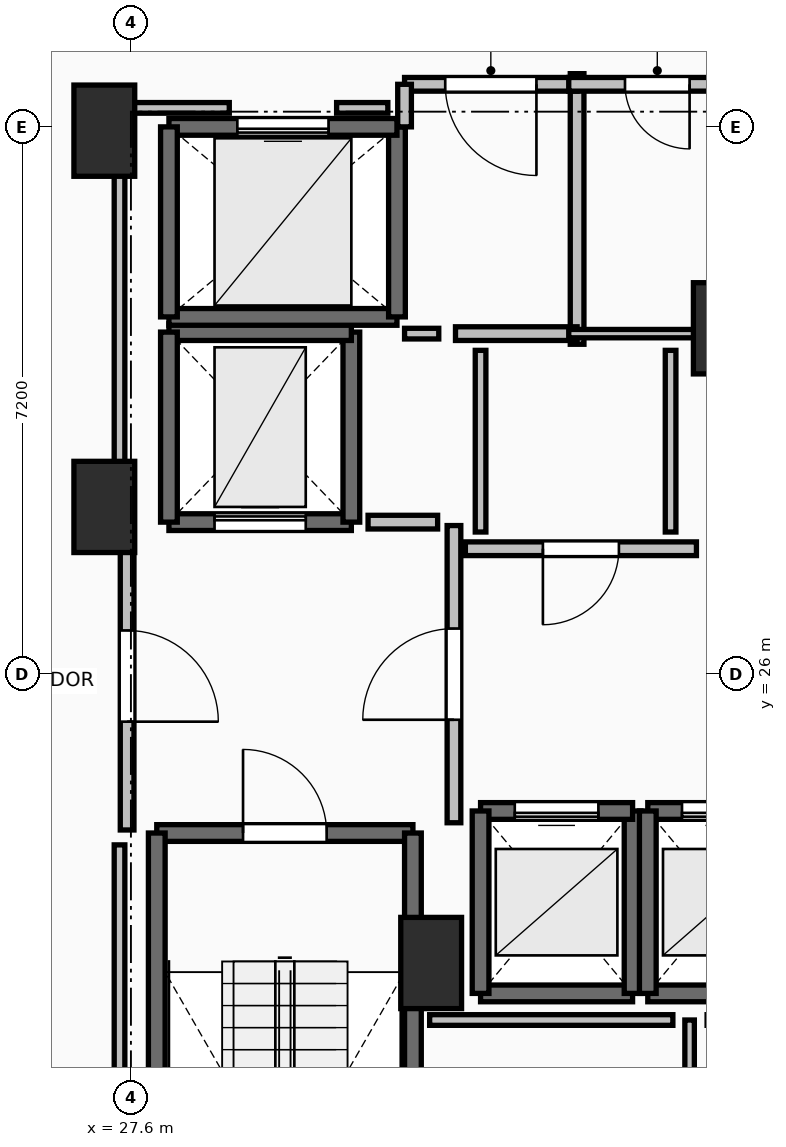
"""IFC4 building model, lengths in metres.
Left out: names, types, materials, properties, quantities, classifications, styles, units other than length and angle.
Written with IfcOpenShell. Run it as: python <this file> out.ifc"""

import sys

from ifc_helpers import new_model, si_unit, direction, frame, frame_2d, origin, origin_2d, place, context, subcontext, project, spatial, rectangle, extrude, element, fill, save


model = new_model("IFC4")
c1 = context("Model", 3, precision=1e-05, world=origin(), true_north=direction((0.0, 1.0)))
c2 = subcontext(c1, "Body", "Model", "MODEL_VIEW")
j1 = project(units=[si_unit("LENGTHUNIT", "METRE"), si_unit("PLANEANGLEUNIT", "RADIAN")], contexts=[c1])
p1 = place(None, origin())
s1 = spatial("IfcSite", under=j1, at=p1, CompositionType="ELEMENT")
p2 = place(p1, origin())
s2 = spatial("IfcBuilding", under=s1, at=p2, CompositionType="ELEMENT")
p3 = place(p2, frame((0.0, 0.0, 132.6)))
s3 = spatial("IfcBuildingStorey", under=s2, at=p3, CompositionType="ELEMENT", Elevation=132.6)
for number, where, z_axis, x_axis in (
    (1, (27.25, 28.2, 0.0), (0.0, 0.0, 1.0), (1.0, 0.0, 0.0)),
    (2, (27.25, 33.15, 0.0), (0.0, 0.0, 1.0), (1.0, 0.0, 0.0)),
    (3, (31.55, 22.2, 0.0), (0.0, 0.0, 1.0), (1.0, 0.0, 0.0)),
    (4, (35.4, 30.55, 0.0), (0.0, 0.0, 1.0), (1.0, 0.0, 0.0)),
):
    element("IfcColumn", number, at=place(p3, frame(where, z_axis=z_axis, x_axis=x_axis)), inside=s3, PredefinedType="PILASTER", context=c2, shape_type="SweptSolid", body=[
        extrude(rectangle(XDim=0.8, YDim=1.2, at=origin_2d()), origin(), (0.0, 0.0, 1.0), 3.5),
    ])
p4 = place(p3, frame((27.94, 23.91, 0.0), z_axis=(0.0, 0.0, 1.0), x_axis=(1.0, 0.0, 0.0)))
e5 = element("IfcWall", 5, at=p4, inside=s3, PredefinedType="SOLIDWALL", context=c2, shape_type="SweptSolid", body=[
    extrude(rectangle(XDim=3.37, YDim=0.22, at=frame_2d((1.685, 0.0))), origin(), (0.0, 0.0, 1.0), 3.24),
])
p5 = place(p4, frame((1.135, 0.0, 0.0)))
e6 = element("IfcOpeningElement", 6, at=p5, cuts=e5, PredefinedType="OPENING", context=c2, shape_type="SweptSolid", body=[
    extrude(rectangle(XDim=1.1, YDim=2.15, at=frame_2d((0.55, 1.075))), frame((0.0, 0.125, 0.0), z_axis=(0.0, -1.0, 0.0), x_axis=(1.0, 0.0, 0.0)), (0.0, 0.0, 1.0), 0.25),
])
for number, where, z_axis, x_axis in (
    (7, (31.31, 23.91, 0.0), (0.0, 0.0, 1.0), (0.0, -1.0, 0.0)),
    (8, (27.94, 16.49, 0.0), (0.0, 0.0, 1.0), (0.0, 1.0, 0.0)),
):
    element("IfcWall", number, at=place(p3, frame(where, z_axis=z_axis, x_axis=x_axis)), inside=s3, PredefinedType="SOLIDWALL", context=c2, shape_type="SweptSolid", body=[
        extrude(rectangle(XDim=7.42, YDim=0.22, at=frame_2d((3.71, 0.0))), origin(), (0.0, 0.0, 1.0), 3.24),
    ])
p6 = place(p3, frame((32.2, 21.8, 0.0), z_axis=(0.0, 0.0, 1.0), x_axis=(1.0, 0.0, 0.0)))
e9 = element("IfcWall", 9, at=p6, inside=s3, PredefinedType="SOLIDWALL", context=c2, shape_type="SweptSolid", body=[
    extrude(rectangle(XDim=2.0, YDim=0.22, at=frame_2d((1.0, 0.0))), origin(), (0.0, 0.0, 1.0), 3.24),
])
p7 = place(p3, frame((34.2, 21.8, 0.0), z_axis=(0.0, 0.0, 1.0), x_axis=(0.0, 1.0, 0.0)))
e10 = element("IfcWall", 10, at=p7, inside=s3, PredefinedType="SOLIDWALL", context=c2, shape_type="SweptSolid", body=[
    extrude(rectangle(XDim=2.4, YDim=0.22, at=frame_2d((1.2, 0.0))), origin(), (0.0, 0.0, 1.0), 3.24),
])
p8 = place(p3, frame((34.2, 24.2, 0.0), z_axis=(0.0, 0.0, 1.0), x_axis=(-1.0, 0.0, 0.0)))
e11 = element("IfcWall", 11, at=p8, inside=s3, PredefinedType="SOLIDWALL", context=c2, shape_type="SweptSolid", body=[
    extrude(rectangle(XDim=2.0, YDim=0.22, at=frame_2d((1.0, 0.0))), origin(), (0.0, 0.0, 1.0), 3.24),
])
p9 = place(p8, frame((0.45, 0.0, 0.0)))
e12 = element("IfcOpeningElement", 12, at=p9, cuts=e11, PredefinedType="OPENING", context=c2, shape_type="SweptSolid", body=[
    extrude(rectangle(XDim=1.1, YDim=2.2, at=frame_2d((0.55, 1.1))), frame((0.0, 0.125, 0.0), z_axis=(0.0, -1.0, 0.0), x_axis=(1.0, 0.0, 0.0)), (0.0, 0.0, 1.0), 0.25),
])
p10 = place(p3, frame((32.2, 24.2, 0.0), z_axis=(0.0, 0.0, 1.0), x_axis=(0.0, -1.0, 0.0)))
e13 = element("IfcWall", 13, at=p10, inside=s3, PredefinedType="SOLIDWALL", context=c2, shape_type="SweptSolid", body=[
    extrude(rectangle(XDim=2.4, YDim=0.22, at=frame_2d((1.2, 0.0))), origin(), (0.0, 0.0, 1.0), 3.24),
])
p11 = place(p3, frame((34.4, 21.8, 0.0), z_axis=(0.0, 0.0, 1.0), x_axis=(1.0, 0.0, 0.0)))
e14 = element("IfcWall", 14, at=p11, inside=s3, PredefinedType="SOLIDWALL", context=c2, shape_type="SweptSolid", body=[
    extrude(rectangle(XDim=2.0, YDim=0.22, at=frame_2d((1.0, 0.0))), origin(), (0.0, 0.0, 1.0), 3.24),
])
p12 = place(p3, frame((36.4, 24.2, 0.0), z_axis=(0.0, 0.0, 1.0), x_axis=(-1.0, 0.0, 0.0)))
e15 = element("IfcWall", 15, at=p12, inside=s3, PredefinedType="SOLIDWALL", context=c2, shape_type="SweptSolid", body=[
    extrude(rectangle(XDim=2.0, YDim=0.22, at=frame_2d((1.0, 0.0))), origin(), (0.0, 0.0, 1.0), 3.24),
])
p13 = place(p12, frame((0.45, 0.0, 0.0)))
e16 = element("IfcOpeningElement", 16, at=p13, cuts=e15, PredefinedType="OPENING", context=c2, shape_type="SweptSolid", body=[
    extrude(rectangle(XDim=1.1, YDim=2.2, at=frame_2d((0.55, 1.1))), frame((0.0, 0.125, 0.0), z_axis=(0.0, -1.0, 0.0), x_axis=(1.0, 0.0, 0.0)), (0.0, 0.0, 1.0), 0.25),
])
p14 = place(p3, frame((34.4, 24.2, 0.0), z_axis=(0.0, 0.0, 1.0), x_axis=(0.0, -1.0, 0.0)))
e17 = element("IfcWall", 17, at=p14, inside=s3, PredefinedType="SOLIDWALL", context=c2, shape_type="SweptSolid", body=[
    extrude(rectangle(XDim=2.4, YDim=0.22, at=frame_2d((1.2, 0.0))), origin(), (0.0, 0.0, 1.0), 3.24),
])
p15 = place(p3, frame((28.1, 28.0, 0.0), z_axis=(0.0, 0.0, 1.0), x_axis=(1.0, 0.0, 0.0)))
e18 = element("IfcWall", 18, at=p15, inside=s3, PredefinedType="SHEAR", context=c2, shape_type="SweptSolid", body=[
    extrude(rectangle(XDim=2.4, YDim=0.22, at=frame_2d((1.2, 0.0))), origin(), (0.0, 0.0, 1.0), 3.24),
])
p16 = place(p15, frame((0.6, 0.0, 0.0)))
e19 = element("IfcOpeningElement", 19, at=p16, cuts=e18, PredefinedType="OPENING", context=c2, shape_type="SweptSolid", body=[
    extrude(rectangle(XDim=1.2, YDim=2.2, at=frame_2d((0.6, 1.1))), frame((0.0, 0.125, 0.0), z_axis=(0.0, -1.0, 0.0), x_axis=(1.0, 0.0, 0.0)), (0.0, 0.0, 1.0), 0.25),
])
p17 = place(p3, frame((30.5, 28.0, 0.0), z_axis=(0.0, 0.0, 1.0), x_axis=(0.0, 1.0, 0.0)))
e20 = element("IfcWall", 20, at=p17, inside=s3, PredefinedType="SHEAR", context=c2, shape_type="SweptSolid", body=[
    extrude(rectangle(XDim=2.5, YDim=0.22, at=frame_2d((1.25, 0.0))), origin(), (0.0, 0.0, 1.0), 3.24),
])
p18 = place(p3, frame((30.5, 30.5, 0.0), z_axis=(0.0, 0.0, 1.0), x_axis=(-1.0, 0.0, 0.0)))
e21 = element("IfcWall", 21, at=p18, inside=s3, PredefinedType="SHEAR", context=c2, shape_type="SweptSolid", body=[
    extrude(rectangle(XDim=2.4, YDim=0.22, at=frame_2d((1.2, 0.0))), origin(), (0.0, 0.0, 1.0), 3.24),
])
p19 = place(p3, frame((28.1, 30.5, 0.0), z_axis=(0.0, 0.0, 1.0), x_axis=(0.0, -1.0, 0.0)))
e22 = element("IfcWall", 22, at=p19, inside=s3, PredefinedType="SHEAR", context=c2, shape_type="SweptSolid", body=[
    extrude(rectangle(XDim=2.5, YDim=0.22, at=frame_2d((1.25, 0.0))), origin(), (0.0, 0.0, 1.0), 3.24),
])
p20 = place(p3, frame((28.1, 30.7, 0.0), z_axis=(0.0, 0.0, 1.0), x_axis=(1.0, 0.0, 0.0)))
e23 = element("IfcWall", 23, at=p20, inside=s3, PredefinedType="SOLIDWALL", context=c2, shape_type="SweptSolid", body=[
    extrude(rectangle(XDim=3.0, YDim=0.22, at=frame_2d((1.5, 0.0))), origin(), (0.0, 0.0, 1.0), 3.24),
])
p21 = place(p3, frame((31.1, 30.7, 0.0), z_axis=(0.0, 0.0, 1.0), x_axis=(0.0, 1.0, 0.0)))
e24 = element("IfcWall", 24, at=p21, inside=s3, PredefinedType="SOLIDWALL", context=c2, shape_type="SweptSolid", body=[
    extrude(rectangle(XDim=2.5, YDim=0.22, at=frame_2d((1.25, 0.0))), origin(), (0.0, 0.0, 1.0), 3.24),
])
p22 = place(p3, frame((31.1, 33.2, 0.0), z_axis=(0.0, 0.0, 1.0), x_axis=(-1.0, 0.0, 0.0)))
e25 = element("IfcWall", 25, at=p22, inside=s3, PredefinedType="SOLIDWALL", context=c2, shape_type="SweptSolid", body=[
    extrude(rectangle(XDim=3.0, YDim=0.22, at=frame_2d((1.5, 0.0))), origin(), (0.0, 0.0, 1.0), 3.24),
])
p23 = place(p22, frame((0.9, 0.0, 0.0)))
e26 = element("IfcOpeningElement", 26, at=p23, cuts=e25, PredefinedType="OPENING", context=c2, shape_type="SweptSolid", body=[
    extrude(rectangle(XDim=1.2, YDim=2.2, at=frame_2d((0.6, 1.1))), frame((0.0, 0.125, 0.0), z_axis=(0.0, -1.0, 0.0), x_axis=(1.0, 0.0, 0.0)), (0.0, 0.0, 1.0), 0.25),
])
p24 = place(p3, frame((28.1, 33.2, 0.0), z_axis=(0.0, 0.0, 1.0), x_axis=(0.0, -1.0, 0.0)))
e27 = element("IfcWall", 27, at=p24, inside=s3, PredefinedType="SOLIDWALL", context=c2, shape_type="SweptSolid", body=[
    extrude(rectangle(XDim=2.5, YDim=0.22, at=frame_2d((1.25, 0.0))), origin(), (0.0, 0.0, 1.0), 3.24),
])
p25 = place(p3, frame((31.85, 24.045, 0.0), z_axis=(0.0, 0.0, 1.0), x_axis=(0.0, 1.0, 0.0)))
e28 = element("IfcWall", 28, at=p25, inside=s3, PredefinedType="PARTITIONING", context=c2, shape_type="SweptSolid", body=[
    extrude(rectangle(XDim=3.91, YDim=0.18, at=frame_2d((1.955, 0.0))), origin(), (0.0, 0.0, 1.0), 3.24),
])
p26 = place(p25, frame((1.355, 0.0, 0.0)))
e29 = element("IfcOpeningElement", 29, at=p26, cuts=e28, PredefinedType="OPENING", context=c2, shape_type="SweptSolid", body=[
    extrude(rectangle(XDim=1.2, YDim=2.15, at=frame_2d((0.6, 1.075))), frame((0.0, 0.105, 0.0), z_axis=(0.0, -1.0, 0.0), x_axis=(1.0, 0.0, 0.0)), (0.0, 0.0, 1.0), 0.21),
])
p27 = place(p3, frame((27.55, 28.0, 0.0), z_axis=(0.0, 0.0, 1.0), x_axis=(0.0, -1.0, 0.0)))
e30 = element("IfcWall", 30, at=p27, inside=s3, PredefinedType="PARTITIONING", context=c2, shape_type="SweptSolid", body=[
    extrude(rectangle(XDim=4.05, YDim=0.18, at=frame_2d((2.025, 0.0))), origin(), (0.0, 0.0, 1.0), 3.24),
])
p28 = place(p27, frame((1.425, 0.0, 0.0)))
e31 = element("IfcOpeningElement", 31, at=p28, cuts=e30, PredefinedType="OPENING", context=c2, shape_type="SweptSolid", body=[
    extrude(rectangle(XDim=1.2, YDim=2.15, at=frame_2d((0.6, 1.075))), frame((0.0, 0.105, 0.0), z_axis=(0.0, -1.0, 0.0), x_axis=(1.0, 0.0, 0.0)), (0.0, 0.0, 1.0), 0.21),
])
p29 = place(p3, frame((33.47, 30.34, 0.0), z_axis=(0.0, 0.0, 1.0), x_axis=(0.0, 1.0, 0.0)))
e32 = element("IfcWall", 32, at=p29, inside=s3, PredefinedType="PARTITIONING", context=c2, shape_type="SweptSolid", body=[
    extrude(rectangle(XDim=3.56, YDim=0.18, at=frame_2d((1.78, 0.0))), origin(), (0.0, 0.0, 1.0), 3.24),
])
p30 = place(p3, frame((31.87, 30.48, 0.0), z_axis=(0.0, 0.0, 1.0), x_axis=(1.0, 0.0, 0.0)))
e33 = element("IfcWall", 33, at=p30, inside=s3, PredefinedType="PARTITIONING", context=c2, shape_type="SweptSolid", body=[
    extrude(rectangle(XDim=1.6, YDim=0.18, at=frame_2d((0.8, 0.0))), origin(), (0.0, 0.0, 1.0), 3.24),
])
p31 = place(p3, frame((33.47, 33.76, 0.0), z_axis=(0.0, 0.0, 1.0), x_axis=(-1.0, 0.0, 0.0)))
e34 = element("IfcWall", 34, at=p31, inside=s3, PredefinedType="PARTITIONING", context=c2, shape_type="SweptSolid", body=[
    extrude(rectangle(XDim=2.27, YDim=0.18, at=frame_2d((1.135, 0.0))), origin(), (0.0, 0.0, 1.0), 3.24),
])
p32 = place(p31, frame((0.535, 0.0, 0.0)))
e35 = element("IfcOpeningElement", 35, at=p32, cuts=e34, PredefinedType="OPENING", context=c2, shape_type="SweptSolid", body=[
    extrude(rectangle(XDim=1.2, YDim=2.15, at=frame_2d((0.6, 1.075))), frame((0.0, 0.105, 0.0), z_axis=(0.0, -1.0, 0.0), x_axis=(1.0, 0.0, 0.0)), (0.0, 0.0, 1.0), 0.21),
])
p33 = place(p3, frame((31.2, 33.76, 0.0), z_axis=(0.0, 0.0, 1.0), x_axis=(0.0, -1.0, 0.0)))
e36 = element("IfcWall", 36, at=p33, inside=s3, PredefinedType="PARTITIONING", context=c2, shape_type="SweptSolid", body=[
    extrude(rectangle(XDim=0.56, YDim=0.18, at=frame_2d((0.28, 0.0))), origin(), (0.0, 0.0, 1.0), 3.24),
])
p34 = place(p3, frame((35.04, 27.65, 0.0), z_axis=(0.0, 0.0, 1.0), x_axis=(-1.0, 0.0, 0.0)))
e37 = element("IfcWall", 37, at=p34, inside=s3, PredefinedType="PARTITIONING", context=c2, shape_type="SweptSolid", body=[
    extrude(rectangle(XDim=3.04, YDim=0.18, at=frame_2d((1.52, 0.0))), origin(), (0.0, 0.0, 1.0), 3.24),
])
p35 = place(p34, frame((1.02, 0.0, 0.0)))
e38 = element("IfcOpeningElement", 38, at=p35, cuts=e37, PredefinedType="OPENING", context=c2, shape_type="SweptSolid", body=[
    extrude(rectangle(XDim=1.0, YDim=2.15, at=frame_2d((0.5, 1.075))), frame((0.0, 0.105, 0.0), z_axis=(0.0, -1.0, 0.0), x_axis=(1.0, 0.0, 0.0)), (0.0, 0.0, 1.0), 0.21),
])
p36 = place(p3, frame((33.36, 30.48, 0.0), z_axis=(0.0, 0.0, 1.0), x_axis=(1.0, 0.0, 0.0)))
e39 = element("IfcWall", 39, at=p36, inside=s3, PredefinedType="PARTITIONING", context=c2, shape_type="SweptSolid", body=[
    extrude(rectangle(XDim=1.81, YDim=0.11, at=frame_2d((0.905, 0.0))), origin(), (0.0, 0.0, 1.0), 3.24),
])
p37 = place(p3, frame((35.69, 33.76, 0.0), z_axis=(0.0, 0.0, 1.0), x_axis=(-1.0, 0.0, 0.0)))
e40 = element("IfcWall", 40, at=p37, inside=s3, PredefinedType="PARTITIONING", context=c2, shape_type="SweptSolid", body=[
    extrude(rectangle(XDim=2.33, YDim=0.18, at=frame_2d((1.165, 0.0))), origin(), (0.0, 0.0, 1.0), 3.24),
])
p38 = place(p37, frame((0.74, 0.0, 0.0)))
e41 = element("IfcOpeningElement", 41, at=p38, cuts=e40, PredefinedType="OPENING", context=c2, shape_type="SweptSolid", body=[
    extrude(rectangle(XDim=0.85, YDim=2.1, at=frame_2d((0.425, 1.05))), frame((0.0, 0.105, 0.0), z_axis=(0.0, -1.0, 0.0), x_axis=(1.0, 0.0, 0.0)), (0.0, 0.0, 1.0), 0.21),
])
p39 = place(p3, frame((34.95, 16.32, 0.0), z_axis=(0.0, 0.0, 1.0), x_axis=(0.0, 1.0, 0.0)))
e42 = element("IfcWall", 42, at=p39, inside=s3, PredefinedType="PARTITIONING", context=c2, shape_type="SweptSolid", body=[
    extrude(rectangle(XDim=5.13, YDim=0.125, at=frame_2d((2.565, 0.0))), origin(), (0.0, 0.0, 1.0), 3.24),
])
p40 = place(p3, frame((31.635, 28.0, 0.0), z_axis=(0.0, 0.0, 1.0), x_axis=(-1.0, 0.0, 0.0)))
e43 = element("IfcWall", 43, at=p40, inside=s3, PredefinedType="PARTITIONING", context=c2, shape_type="SweptSolid", body=[
    extrude(rectangle(XDim=0.915, YDim=0.18, at=frame_2d((0.458, 0.0))), origin(), (0.0, 0.0, 1.0), 3.24),
])
p41 = place(p3, frame((31.2, 30.48, 0.0), z_axis=(0.0, 0.0, 1.0), x_axis=(1.0, 0.0, 0.0)))
e44 = element("IfcWall", 44, at=p41, inside=s3, PredefinedType="PARTITIONING", context=c2, shape_type="SweptSolid", body=[
    extrude(rectangle(XDim=0.45, YDim=0.14, at=frame_2d((0.225, 0.0))), origin(), (0.0, 0.0, 1.0), 3.24),
])
p42 = place(p3, frame((34.73, 21.45, 0.0), z_axis=(0.0, 0.0, 1.0), x_axis=(-1.0, 0.0, 0.0)))
e45 = element("IfcWall", 45, at=p42, inside=s3, PredefinedType="PARTITIONING", context=c2, shape_type="SweptSolid", body=[
    extrude(rectangle(XDim=3.2, YDim=0.14, at=frame_2d((1.6, 0.0))), origin(), (0.0, 0.0, 1.0), 3.24),
])
for number, where, z_axis, x_axis in (
    (46, (32.2, 30.26, 0.0), (0.0, 0.0, 1.0), (0.0, -1.0, 0.0)),
    (47, (34.7, 27.87, 0.0), (0.0, 0.0, 1.0), (0.0, 1.0, 0.0)),
):
    element("IfcWall", number, at=place(p3, frame(where, z_axis=z_axis, x_axis=x_axis)), inside=s3, PredefinedType="PARTITIONING", context=c2, shape_type="SweptSolid", body=[
        extrude(rectangle(XDim=2.39, YDim=0.14, at=frame_2d((1.195, 0.0))), origin(), (0.0, 0.0, 1.0), 3.24),
    ])
p43 = place(p3, frame((30.98, 33.45, 0.0), z_axis=(0.0, 0.0, 1.0), x_axis=(-1.0, 0.0, 0.0)))
e48 = element("IfcWall", 48, at=p43, inside=s3, PredefinedType="PARTITIONING", context=c2, shape_type="SweptSolid", body=[
    extrude(rectangle(XDim=0.674, YDim=0.14, at=frame_2d((0.337, 0.0))), origin(), (0.0, 0.0, 1.0), 3.24),
])
p44 = place(p3, frame((28.894, 33.45, 0.0), z_axis=(0.0, 0.0, 1.0), x_axis=(-1.0, 0.0, 0.0)))
e49 = element("IfcWall", 49, at=p44, inside=s3, PredefinedType="PARTITIONING", context=c2, shape_type="SweptSolid", body=[
    extrude(rectangle(XDim=1.444, YDim=0.14, at=frame_2d((0.722, 0.0))), origin(), (0.0, 0.0, 1.0), 2.432),
])
p45 = place(p3, frame((27.45, 33.45, 0.0), z_axis=(0.0, 0.0, 1.0), x_axis=(0.0, -1.0, 0.0)))
e50 = element("IfcWall", 50, at=p45, inside=s3, PredefinedType="PARTITIONING", context=c2, shape_type="SweptSolid", body=[
    extrude(rectangle(XDim=5.254, YDim=0.14, at=frame_2d((2.627, 0.0))), origin(), (0.0, 0.0, 1.0), 2.432),
])
p46 = place(p3, frame((27.45, 23.754, 0.0), z_axis=(0.0, 0.0, 1.0), x_axis=(0.0, -1.0, 0.0)))
e51 = element("IfcWall", 51, at=p46, inside=s3, PredefinedType="PARTITIONING", context=c2, shape_type="SweptSolid", body=[
    extrude(rectangle(XDim=7.514, YDim=0.14, at=frame_2d((3.757, 0.0))), origin(), (0.0, 0.0, 1.0), 2.432),
])
p47 = place(p5, origin())
e52 = element("IfcDoor", 52, at=p47, inside=s3, OperationType="SINGLE_SWING_LEFT", PredefinedType="DOOR", context=c2, shape_type="SweptSolid", body=[
    extrude(rectangle(XDim=1.1, YDim=2.15, at=frame_2d((0.55, 1.075))), frame((0.0, 0.025, 0.0), z_axis=(0.0, -1.0, 0.0), x_axis=(1.0, 0.0, 0.0)), (0.0, 0.0, 1.0), 0.05),
])
fill(e6, e52)
p48 = place(p9, origin())
e53 = element("IfcDoor", 53, at=p48, inside=s3, OperationType="SLIDING_TO_LEFT", PredefinedType="DOOR", context=c2, shape_type="SweptSolid", body=[
    extrude(rectangle(XDim=1.1, YDim=2.2, at=frame_2d((0.55, 1.1))), frame((0.0, 0.025, 0.0), z_axis=(0.0, -1.0, 0.0), x_axis=(1.0, 0.0, 0.0)), (0.0, 0.0, 1.0), 0.05),
])
fill(e12, e53)
p49 = place(p13, origin())
e54 = element("IfcDoor", 54, at=p49, inside=s3, OperationType="SLIDING_TO_LEFT", PredefinedType="DOOR", context=c2, shape_type="SweptSolid", body=[
    extrude(rectangle(XDim=1.1, YDim=2.2, at=frame_2d((0.55, 1.1))), frame((0.0, 0.025, 0.0), z_axis=(0.0, -1.0, 0.0), x_axis=(1.0, 0.0, 0.0)), (0.0, 0.0, 1.0), 0.05),
])
fill(e16, e54)
p50 = place(p16, origin())
e55 = element("IfcDoor", 55, at=p50, inside=s3, OperationType="SLIDING_TO_LEFT", PredefinedType="DOOR", context=c2, shape_type="SweptSolid", body=[
    extrude(rectangle(XDim=1.2, YDim=2.2, at=frame_2d((0.6, 1.1))), frame((0.0, 0.025, 0.0), z_axis=(0.0, -1.0, 0.0), x_axis=(1.0, 0.0, 0.0)), (0.0, 0.0, 1.0), 0.05),
])
fill(e19, e55)
p51 = place(p23, origin())
e56 = element("IfcDoor", 56, at=p51, inside=s3, OperationType="SLIDING_TO_LEFT", PredefinedType="DOOR", context=c2, shape_type="SweptSolid", body=[
    extrude(rectangle(XDim=1.2, YDim=2.2, at=frame_2d((0.6, 1.1))), frame((0.0, 0.025, 0.0), z_axis=(0.0, -1.0, 0.0), x_axis=(1.0, 0.0, 0.0)), (0.0, 0.0, 1.0), 0.05),
])
fill(e26, e56)
p52 = place(p26, origin())
e57 = element("IfcDoor", 57, at=p52, inside=s3, OperationType="SINGLE_SWING_LEFT", PredefinedType="DOOR", context=c2, shape_type="SweptSolid", body=[
    extrude(rectangle(XDim=1.2, YDim=2.15, at=frame_2d((0.6, 1.075))), frame((0.0, 0.025, 0.0), z_axis=(0.0, -1.0, 0.0), x_axis=(1.0, 0.0, 0.0)), (0.0, 0.0, 1.0), 0.05),
])
fill(e29, e57)
p53 = place(p28, origin())
e58 = element("IfcDoor", 58, at=p53, inside=s3, OperationType="SINGLE_SWING_RIGHT", PredefinedType="DOOR", context=c2, shape_type="SweptSolid", body=[
    extrude(rectangle(XDim=1.2, YDim=2.15, at=frame_2d((0.6, 1.075))), frame((0.0, 0.025, 0.0), z_axis=(0.0, -1.0, 0.0), x_axis=(1.0, 0.0, 0.0)), (0.0, 0.0, 1.0), 0.05),
])
fill(e31, e58)
p54 = place(p32, origin())
e59 = element("IfcDoor", 59, at=p54, inside=s3, OperationType="SINGLE_SWING_LEFT", PredefinedType="DOOR", context=c2, shape_type="SweptSolid", body=[
    extrude(rectangle(XDim=1.2, YDim=2.15, at=frame_2d((0.6, 1.075))), frame((0.0, 0.025, 0.0), z_axis=(0.0, -1.0, 0.0), x_axis=(1.0, 0.0, 0.0)), (0.0, 0.0, 1.0), 0.05),
])
fill(e35, e59)
p55 = place(p35, origin())
e60 = element("IfcDoor", 60, at=p55, inside=s3, OperationType="SINGLE_SWING_RIGHT", PredefinedType="DOOR", context=c2, shape_type="SweptSolid", body=[
    extrude(rectangle(XDim=1.0, YDim=2.15, at=frame_2d((0.5, 1.075))), frame((0.0, 0.025, 0.0), z_axis=(0.0, -1.0, 0.0), x_axis=(1.0, 0.0, 0.0)), (0.0, 0.0, 1.0), 0.05),
])
fill(e38, e60)
p56 = place(p38, origin())
e61 = element("IfcDoor", 61, at=p56, inside=s3, OperationType="SINGLE_SWING_LEFT", PredefinedType="DOOR", context=c2, shape_type="SweptSolid", body=[
    extrude(rectangle(XDim=0.85, YDim=2.1, at=frame_2d((0.425, 1.05))), frame((0.0, 0.025, 0.0), z_axis=(0.0, -1.0, 0.0), x_axis=(1.0, 0.0, 0.0)), (0.0, 0.0, 1.0), 0.05),
])
fill(e41, e61)
save(model, sys.argv[1])
